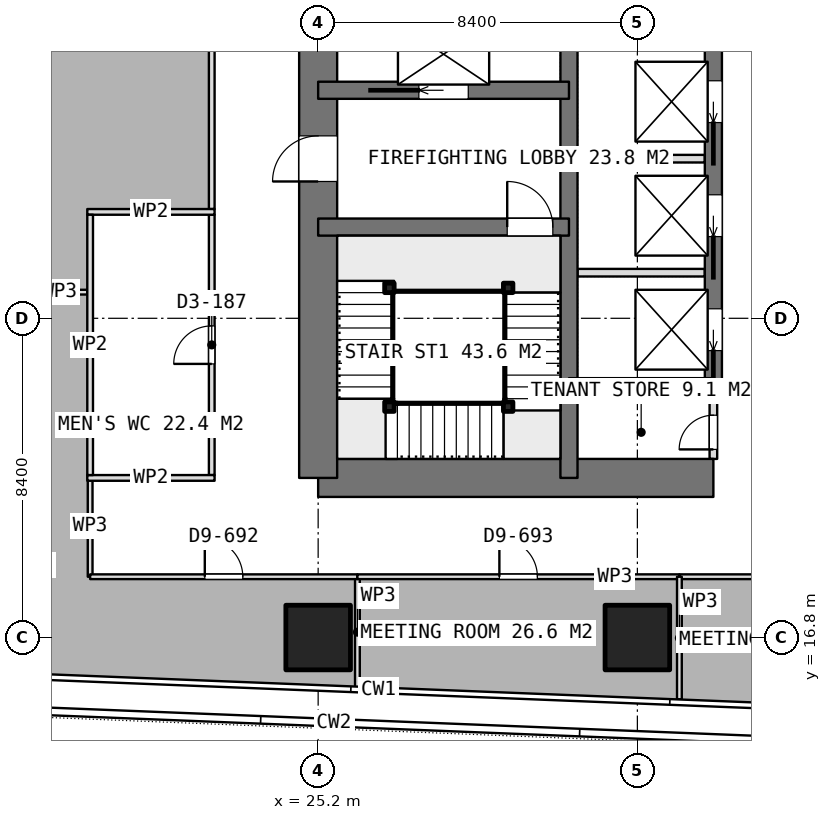
"""IFC4 building model, lengths in metres.
Left out: names, types, materials, properties, quantities, classifications, styles, units other than length and angle.
Written with IfcOpenShell. Run it as: python <this file> out.ifc"""

import sys

from ifc_helpers import new_model, si_unit, direction, frame, frame_2d, origin, origin_2d, place, context, subcontext, project, spatial, rectangle, extrude, element, fill, save


model = new_model("IFC4")
c1 = context("Model", 3, precision=1e-05, world=origin(), true_north=direction((0.0, 1.0)))
c2 = subcontext(c1, "Body", "Model", "MODEL_VIEW")
j1 = project(units=[si_unit("LENGTHUNIT", "METRE"), si_unit("PLANEANGLEUNIT", "RADIAN")], contexts=[c1])
p1 = place(None, origin())
s1 = spatial("IfcSite", under=j1, at=p1, CompositionType="ELEMENT")
p2 = place(p1, origin())
s2 = spatial("IfcBuilding", under=s1, at=p2, CompositionType="ELEMENT")
p3 = place(p2, frame((0.0, 0.0, 180.2)))
s3 = spatial("IfcBuildingStorey", under=s2, at=p3, CompositionType="ELEMENT", Elevation=180.2)
p4 = place(p3, frame((25.2, 21.0, 0.0), z_axis=(0.0, 0.0, 1.0), x_axis=(1.0, 0.0, 0.0)))
e1 = element("IfcWall", 1, at=p4, inside=s3, PredefinedType="SHEAR", context=c2, shape_type="SweptSolid", body=[
    extrude(rectangle(XDim=10.4, YDim=1.0, at=frame_2d((5.2, 0.0))), origin(), (0.0, 0.0, 1.0), 3.75),
])
p5 = place(p3, frame((25.2, 21.0, 0.0), z_axis=(0.0, 0.0, 1.0), x_axis=(0.0, 1.0, 0.0)))
e2 = element("IfcWall", 2, at=p5, inside=s3, PredefinedType="SHEAR", context=c2, shape_type="SweptSolid", body=[
    extrude(rectangle(XDim=25.2, YDim=1.0, at=frame_2d((12.6, 0.0))), origin(), (0.0, 0.0, 1.0), 3.75),
])
p6 = place(p5, frame((7.8, 0.0, 0.0)))
e3 = element("IfcOpeningElement", 3, at=p6, cuts=e2, PredefinedType="OPENING", context=c2, shape_type="SweptSolid", body=[
    extrude(rectangle(XDim=1.2, YDim=2.1, at=frame_2d((0.6, 1.05))), frame((0.0, 0.51, 0.0), z_axis=(0.0, -1.0, 0.0), x_axis=(1.0, 0.0, 0.0)), (0.0, 0.0, 1.0), 1.02),
])
p7 = place(p5, frame((14.25, 0.0, 0.0)))
e4 = element("IfcOpeningElement", 4, at=p7, cuts=e2, PredefinedType="OPENING", context=c2, shape_type="SweptSolid", body=[
    extrude(rectangle(XDim=0.9, YDim=2.1, at=frame_2d((0.45, 1.05))), frame((0.0, 0.51, 0.0), z_axis=(0.0, -1.0, 0.0), x_axis=(1.0, 0.0, 0.0)), (0.0, 0.0, 1.0), 1.02),
])
p8 = place(p5, frame((16.85, 0.0, 0.0)))
e5 = element("IfcOpeningElement", 5, at=p8, cuts=e2, PredefinedType="OPENING", context=c2, shape_type="SweptSolid", body=[
    extrude(rectangle(XDim=0.9, YDim=2.1, at=frame_2d((0.45, 1.05))), frame((0.0, 0.51, 0.0), z_axis=(0.0, -1.0, 0.0), x_axis=(1.0, 0.0, 0.0)), (0.0, 0.0, 1.0), 1.02),
])
p9 = place(p5, frame((19.025, 0.0, 0.0)))
e6 = element("IfcOpeningElement", 6, at=p9, cuts=e2, PredefinedType="OPENING", context=c2, shape_type="SweptSolid", body=[
    extrude(rectangle(XDim=1.2, YDim=2.1, at=frame_2d((0.6, 1.05))), frame((0.0, 0.51, 0.0), z_axis=(0.0, -1.0, 0.0), x_axis=(1.0, 0.0, 0.0)), (0.0, 0.0, 1.0), 1.02),
])
p10 = place(p3, frame((31.8, 21.0, 0.0), z_axis=(0.0, 0.0, 1.0), x_axis=(0.0, 1.0, 0.0)))
e7 = element("IfcWall", 7, at=p10, inside=s3, PredefinedType="SHEAR", context=c2, shape_type="SweptSolid", body=[
    extrude(rectangle(XDim=25.2, YDim=0.45, at=frame_2d((12.6, 0.0))), origin(), (0.0, 0.0, 1.0), 3.75),
])
p11 = place(p3, frame((35.6, 23.4, 0.0), z_axis=(0.0, 0.0, 1.0), x_axis=(0.0, 1.0, 0.0)))
e8 = element("IfcWall", 8, at=p11, inside=s3, PredefinedType="SHEAR", context=c2, shape_type="SweptSolid", body=[
    extrude(rectangle(XDim=18.0, YDim=0.45, at=frame_2d((9.0, 0.0))), origin(), (0.0, 0.0, 1.0), 3.75),
])
p12 = place(p11, frame((0.95, 0.0, 0.0)))
e9 = element("IfcOpeningElement", 9, at=p12, cuts=e8, PredefinedType="OPENING", context=c2, shape_type="SweptSolid", body=[
    extrude(rectangle(XDim=1.1, YDim=2.1, at=frame_2d((0.55, 1.05))), frame((0.0, 0.235, 0.0), z_axis=(0.0, -1.0, 0.0), x_axis=(1.0, 0.0, 0.0)), (0.0, 0.0, 1.0), 0.47),
])
p13 = place(p11, frame((3.95, 0.0, 0.0)))
e10 = element("IfcOpeningElement", 10, at=p13, cuts=e8, PredefinedType="OPENING", context=c2, shape_type="SweptSolid", body=[
    extrude(rectangle(XDim=1.1, YDim=2.1, at=frame_2d((0.55, 1.05))), frame((0.0, 0.235, 0.0), z_axis=(0.0, -1.0, 0.0), x_axis=(1.0, 0.0, 0.0)), (0.0, 0.0, 1.0), 0.47),
])
p14 = place(p11, frame((6.95, 0.0, 0.0)))
e11 = element("IfcOpeningElement", 11, at=p14, cuts=e8, PredefinedType="OPENING", context=c2, shape_type="SweptSolid", body=[
    extrude(rectangle(XDim=1.1, YDim=2.1, at=frame_2d((0.55, 1.05))), frame((0.0, 0.235, 0.0), z_axis=(0.0, -1.0, 0.0), x_axis=(1.0, 0.0, 0.0)), (0.0, 0.0, 1.0), 0.47),
])
p15 = place(p11, frame((9.95, 0.0, 0.0)))
e12 = element("IfcOpeningElement", 12, at=p15, cuts=e8, PredefinedType="OPENING", context=c2, shape_type="SweptSolid", body=[
    extrude(rectangle(XDim=1.1, YDim=2.1, at=frame_2d((0.55, 1.05))), frame((0.0, 0.235, 0.0), z_axis=(0.0, -1.0, 0.0), x_axis=(1.0, 0.0, 0.0)), (0.0, 0.0, 1.0), 0.47),
])
p16 = place(p11, frame((12.95, 0.0, 0.0)))
e13 = element("IfcOpeningElement", 13, at=p16, cuts=e8, PredefinedType="OPENING", context=c2, shape_type="SweptSolid", body=[
    extrude(rectangle(XDim=1.1, YDim=2.1, at=frame_2d((0.55, 1.05))), frame((0.0, 0.235, 0.0), z_axis=(0.0, -1.0, 0.0), x_axis=(1.0, 0.0, 0.0)), (0.0, 0.0, 1.0), 0.47),
])
p17 = place(p11, frame((15.95, 0.0, 0.0)))
e14 = element("IfcOpeningElement", 14, at=p17, cuts=e8, PredefinedType="OPENING", context=c2, shape_type="SweptSolid", body=[
    extrude(rectangle(XDim=1.1, YDim=2.1, at=frame_2d((0.55, 1.05))), frame((0.0, 0.235, 0.0), z_axis=(0.0, -1.0, 0.0), x_axis=(1.0, 0.0, 0.0)), (0.0, 0.0, 1.0), 0.47),
])
p18 = place(p3, frame((31.8, 23.4, 0.0), z_axis=(0.0, 0.0, 1.0), x_axis=(1.0, 0.0, 0.0)))
e15 = element("IfcWall", 15, at=p18, inside=s3, PredefinedType="SHEAR", context=c2, shape_type="SweptSolid", body=[
    extrude(rectangle(XDim=3.8, YDim=0.45, at=frame_2d((1.9, 0.0))), origin(), (0.0, 0.0, 1.0), 3.75),
])
p19 = place(p3, frame((25.2, 27.6, 0.0), z_axis=(0.0, 0.0, 1.0), x_axis=(1.0, 0.0, 0.0)))
e16 = element("IfcWall", 16, at=p19, inside=s3, PredefinedType="SHEAR", context=c2, shape_type="SweptSolid", body=[
    extrude(rectangle(XDim=6.6, YDim=0.45, at=frame_2d((3.3, 0.0))), origin(), (0.0, 0.0, 1.0), 3.75),
])
p20 = place(p19, frame((4.975, 0.0, 0.0)))
e17 = element("IfcOpeningElement", 17, at=p20, cuts=e16, PredefinedType="OPENING", context=c2, shape_type="SweptSolid", body=[
    extrude(rectangle(XDim=1.2, YDim=2.1, at=frame_2d((0.6, 1.05))), frame((0.0, 0.235, 0.0), z_axis=(0.0, -1.0, 0.0), x_axis=(1.0, 0.0, 0.0)), (0.0, 0.0, 1.0), 0.47),
])
p21 = place(p3, frame((25.2, 31.2, 0.0), z_axis=(0.0, 0.0, 1.0), x_axis=(1.0, 0.0, 0.0)))
e18 = element("IfcWall", 18, at=p21, inside=s3, PredefinedType="SHEAR", context=c2, shape_type="SweptSolid", body=[
    extrude(rectangle(XDim=6.6, YDim=0.45, at=frame_2d((3.3, 0.0))), origin(), (0.0, 0.0, 1.0), 3.75),
])
p22 = place(p21, frame((2.65, 0.0, 0.0)))
e19 = element("IfcOpeningElement", 19, at=p22, cuts=e18, PredefinedType="OPENING", context=c2, shape_type="SweptSolid", body=[
    extrude(rectangle(XDim=1.3, YDim=2.1, at=frame_2d((0.65, 1.05))), frame((0.0, 0.235, 0.0), z_axis=(0.0, -1.0, 0.0), x_axis=(1.0, 0.0, 0.0)), (0.0, 0.0, 1.0), 0.47),
])
for number, where, z_axis, x_axis in (
    (20, (25.2, 16.8, 0.0), (0.0, 0.0, 1.0), (1.0, 0.0, 0.0)),
    (21, (33.6, 16.8, 0.0), (0.0, 0.0, 1.0), (1.0, 0.0, 0.0)),
):
    element("IfcColumn", number, at=place(p3, frame(where, z_axis=z_axis, x_axis=x_axis)), inside=s3, PredefinedType="COLUMN", context=c2, shape_type="SweptSolid", body=[
        extrude(rectangle(XDim=1.7, YDim=1.7, at=origin_2d()), origin(), (0.0, 0.0, 1.0), 3.75),
    ])
for number, where, z_axis, x_axis in (
    (22, (32.025, 26.4, 0.0), (0.0, 0.0, 1.0), (1.0, 0.0, 0.0)),
    (23, (32.025, 29.4, 0.0), (0.0, 0.0, 1.0), (1.0, 0.0, 0.0)),
):
    element("IfcWall", number, at=place(p3, frame(where, z_axis=z_axis, x_axis=x_axis)), inside=s3, PredefinedType="PARTITIONING", context=c2, shape_type="SweptSolid", body=[
        extrude(rectangle(XDim=3.35, YDim=0.2, at=frame_2d((1.675, 0.0))), origin(), (0.0, 0.0, 1.0), 3.5),
    ])
p23 = place(p3, frame((35.6, 21.5, 0.0), z_axis=(0.0, 0.0, 1.0), x_axis=(0.0, 1.0, 0.0)))
e24 = element("IfcWall", 24, at=p23, inside=s3, PredefinedType="PARTITIONING", context=c2, shape_type="SweptSolid", body=[
    extrude(rectangle(XDim=1.675, YDim=0.2, at=frame_2d((0.837, 0.0))), origin(), (0.0, 0.0, 1.0), 3.5),
])
p24 = place(p23, frame((0.25, 0.0, 0.0)))
e25 = element("IfcOpeningElement", 25, at=p24, cuts=e24, PredefinedType="OPENING", context=c2, shape_type="SweptSolid", body=[
    extrude(rectangle(XDim=0.9, YDim=2.1, at=frame_2d((0.45, 1.05))), frame((0.0, 0.11, 0.0), z_axis=(0.0, -1.0, 0.0), x_axis=(1.0, 0.0, 0.0)), (0.0, 0.0, 1.0), 0.22),
])
for number, where, z_axis, x_axis in (
    (26, (19.125, 21.0, 0.0), (0.0, 0.0, 1.0), (1.0, 0.0, 0.0)),
    (27, (19.125, 28.0, 0.0), (0.0, 0.0, 1.0), (1.0, 0.0, 0.0)),
):
    element("IfcWall", number, at=place(p3, frame(where, z_axis=z_axis, x_axis=x_axis)), inside=s3, PredefinedType="PARTITIONING", context=c2, shape_type="SweptSolid", body=[
        extrude(rectangle(XDim=3.35, YDim=0.15, at=frame_2d((1.675, 0.0))), origin(), (0.0, 0.0, 1.0), 3.5),
    ])
p25 = place(p3, frame((19.2, 21.075, 0.0), z_axis=(0.0, 0.0, 1.0), x_axis=(0.0, 1.0, 0.0)))
e28 = element("IfcWall", 28, at=p25, inside=s3, PredefinedType="PARTITIONING", context=c2, shape_type="SweptSolid", body=[
    extrude(rectangle(XDim=6.85, YDim=0.15, at=frame_2d((3.425, 0.0))), origin(), (0.0, 0.0, 1.0), 3.5),
])
p26 = place(p3, frame((22.4, 21.075, 0.0), z_axis=(0.0, 0.0, 1.0), x_axis=(0.0, 1.0, 0.0)))
e29 = element("IfcWall", 29, at=p26, inside=s3, PredefinedType="PARTITIONING", context=c2, shape_type="SweptSolid", body=[
    extrude(rectangle(XDim=6.85, YDim=0.15, at=frame_2d((3.425, 0.0))), origin(), (0.0, 0.0, 1.0), 3.5),
])
p27 = place(p26, frame((2.925, 0.0, 0.0)))
e30 = element("IfcOpeningElement", 30, at=p27, cuts=e29, PredefinedType="OPENING", context=c2, shape_type="SweptSolid", body=[
    extrude(rectangle(XDim=1.0, YDim=2.1, at=frame_2d((0.5, 1.05))), frame((0.0, 0.085, 0.0), z_axis=(0.0, -1.0, 0.0), x_axis=(1.0, 0.0, 0.0)), (0.0, 0.0, 1.0), 0.17),
])
p28 = place(p3, frame((34.706, 18.4, 0.0), z_axis=(0.0, 0.0, 1.0), x_axis=(1.0, 0.0, 0.0)))
e31 = element("IfcWall", 31, at=p28, inside=s3, PredefinedType="PARTITIONING", context=c2, shape_type="SweptSolid", body=[
    extrude(rectangle(XDim=8.291, YDim=0.125, at=frame_2d((4.146, 0.0))), origin(), (0.0, 0.0, 1.0), 3.5),
])
p29 = place(p28, frame((3.645, 0.0, 0.0)))
e32 = element("IfcOpeningElement", 32, at=p29, cuts=e31, PredefinedType="OPENING", context=c2, shape_type="SweptSolid", body=[
    extrude(rectangle(XDim=1.0, YDim=2.1, at=frame_2d((0.5, 1.05))), frame((0.0, 0.073, 0.0), z_axis=(0.0, -1.0, 0.0), x_axis=(1.0, 0.0, 0.0)), (0.0, 0.0, 1.0), 0.145),
])
p30 = place(p3, frame((34.706, 15.175, 0.0), z_axis=(0.0, 0.0, 1.0), x_axis=(0.0, 1.0, 0.0)))
e33 = element("IfcWall", 33, at=p30, inside=s3, PredefinedType="PARTITIONING", context=c2, shape_type="SweptSolid", body=[
    extrude(rectangle(XDim=3.225, YDim=0.125, at=frame_2d((1.612, 0.0))), origin(), (0.0, 0.0, 1.0), 3.5),
])
p31 = place(p3, frame((26.233, 18.4, 0.0), z_axis=(0.0, 0.0, 1.0), x_axis=(0.0, -1.0, 0.0)))
e34 = element("IfcWall", 34, at=p31, inside=s3, PredefinedType="PARTITIONING", context=c2, shape_type="SweptSolid", body=[
    extrude(rectangle(XDim=2.917, YDim=0.125, at=frame_2d((1.458, 0.0))), origin(), (0.0, 0.0, 1.0), 3.5),
])
p32 = place(p3, frame((17.67, 25.888, 0.0), z_axis=(0.0, 0.0, 1.0), x_axis=(1.0, 0.0, 0.0)))
e35 = element("IfcWall", 35, at=p32, inside=s3, PredefinedType="PARTITIONING", context=c2, shape_type="SweptSolid", body=[
    extrude(rectangle(XDim=1.455, YDim=0.125, at=frame_2d((0.728, 0.0))), origin(), (0.0, 0.0, 1.0), 3.5),
])
p33 = place(p3, frame((19.2, 21.075, 0.0), z_axis=(0.0, 0.0, 1.0), x_axis=(0.0, -1.0, 0.0)))
e36 = element("IfcWall", 36, at=p33, inside=s3, PredefinedType="PARTITIONING", context=c2, shape_type="SweptSolid", body=[
    extrude(rectangle(XDim=2.675, YDim=0.125, at=frame_2d((1.337, 0.0))), origin(), (0.0, 0.0, 1.0), 3.5),
])
p34 = place(p3, frame((19.2, 18.4, 0.0), z_axis=(0.0, 0.0, 1.0), x_axis=(1.0, 0.0, 0.0)))
e37 = element("IfcWall", 37, at=p34, inside=s3, PredefinedType="PARTITIONING", context=c2, shape_type="SweptSolid", body=[
    extrude(rectangle(XDim=7.033, YDim=0.125, at=frame_2d((3.517, 0.0))), origin(), (0.0, 0.0, 1.0), 3.5),
])
p35 = place(p34, frame((3.017, 0.0, 0.0)))
e38 = element("IfcOpeningElement", 38, at=p35, cuts=e37, PredefinedType="OPENING", context=c2, shape_type="SweptSolid", body=[
    extrude(rectangle(XDim=1.0, YDim=2.1, at=frame_2d((0.5, 1.05))), frame((0.0, 0.073, 0.0), z_axis=(0.0, -1.0, 0.0), x_axis=(1.0, 0.0, 0.0)), (0.0, 0.0, 1.0), 0.145),
])
p36 = place(p3, frame((26.233, 18.4, 0.0), z_axis=(0.0, 0.0, 1.0), x_axis=(1.0, 0.0, 0.0)))
e39 = element("IfcWall", 39, at=p36, inside=s3, PredefinedType="PARTITIONING", context=c2, shape_type="SweptSolid", body=[
    extrude(rectangle(XDim=8.472, YDim=0.125, at=frame_2d((4.236, 0.0))), origin(), (0.0, 0.0, 1.0), 3.5),
])
p37 = place(p36, frame((3.736, 0.0, 0.0)))
e40 = element("IfcOpeningElement", 40, at=p37, cuts=e39, PredefinedType="OPENING", context=c2, shape_type="SweptSolid", body=[
    extrude(rectangle(XDim=1.0, YDim=2.1, at=frame_2d((0.5, 1.05))), frame((0.0, 0.073, 0.0), z_axis=(0.0, -1.0, 0.0), x_axis=(1.0, 0.0, 0.0)), (0.0, 0.0, 1.0), 0.145),
])
p38 = place(p3, frame((22.4, 52.75, 0.0), z_axis=(0.0, 0.0, 1.0), x_axis=(0.0, -1.0, 0.0)))
e41 = element("IfcWall", 41, at=p38, inside=s3, PredefinedType="PARTITIONING", context=c2, shape_type="SweptSolid", body=[
    extrude(rectangle(XDim=24.675, YDim=0.15, at=frame_2d((12.337, 0.0))), origin(), (0.0, 0.0, 1.0), 3.5),
])
p39 = place(p38, frame((11.875, 0.0, 0.0)))
e42 = element("IfcOpeningElement", 42, at=p39, cuts=e41, PredefinedType="OPENING", context=c2, shape_type="SweptSolid", body=[
    extrude(rectangle(XDim=1.0, YDim=2.1, at=frame_2d((0.5, 1.05))), frame((0.0, 0.085, 0.0), z_axis=(0.0, -1.0, 0.0), x_axis=(1.0, 0.0, 0.0)), (0.0, 0.0, 1.0), 0.17),
])
for number, where, z_axis, x_axis in (
    (43, (30.2, 26.0, 0.0), (0.0, 0.0, 1.0), (1.0, 0.0, 0.0)),
    (44, (30.2, 22.875, 0.0), (0.0, 0.0, 1.0), (1.0, 0.0, 0.0)),
    (45, (27.075, 22.875, 0.0), (0.0, 0.0, 1.0), (1.0, 0.0, 0.0)),
    (46, (27.075, 26.0, 0.0), (0.0, 0.0, 1.0), (1.0, 0.0, 0.0)),
):
    element("IfcColumn", number, at=place(p3, frame(where, z_axis=z_axis, x_axis=x_axis)), inside=s3, PredefinedType="COLUMN", context=c2, shape_type="SweptSolid", body=[
        extrude(rectangle(XDim=0.25, YDim=0.25, at=origin_2d()), origin(), (0.0, 0.0, 1.0), 3.75),
    ])
p40 = place(p6, origin())
e47 = element("IfcDoor", 47, at=p40, inside=s3, OperationType="SINGLE_SWING_LEFT", PredefinedType="DOOR", context=c2, shape_type="SweptSolid", body=[
    extrude(rectangle(XDim=1.2, YDim=2.1, at=frame_2d((0.6, 1.05))), frame((0.0, 0.025, 0.0), z_axis=(0.0, -1.0, 0.0), x_axis=(1.0, 0.0, 0.0)), (0.0, 0.0, 1.0), 0.05),
])
fill(e3, e47)
p41 = place(p24, origin())
e48 = element("IfcDoor", 48, at=p41, inside=s3, OperationType="SINGLE_SWING_LEFT", PredefinedType="DOOR", context=c2, shape_type="SweptSolid", body=[
    extrude(rectangle(XDim=0.9, YDim=2.1, at=frame_2d((0.45, 1.05))), frame((0.0, 0.025, 0.0), z_axis=(0.0, -1.0, 0.0), x_axis=(1.0, 0.0, 0.0)), (0.0, 0.0, 1.0), 0.05),
])
fill(e25, e48)
p42 = place(p12, origin())
e49 = element("IfcDoor", 49, at=p42, inside=s3, OperationType="SLIDING_TO_LEFT", PredefinedType="USERDEFINED", context=c2, shape_type="SweptSolid", body=[
    extrude(rectangle(XDim=1.1, YDim=2.1, at=frame_2d((0.55, 1.05))), frame((0.0, 0.025, 0.0), z_axis=(0.0, -1.0, 0.0), x_axis=(1.0, 0.0, 0.0)), (0.0, 0.0, 1.0), 0.05),
])
fill(e9, e49)
p43 = place(p13, origin())
e50 = element("IfcDoor", 50, at=p43, inside=s3, OperationType="SLIDING_TO_LEFT", PredefinedType="USERDEFINED", context=c2, shape_type="SweptSolid", body=[
    extrude(rectangle(XDim=1.1, YDim=2.1, at=frame_2d((0.55, 1.05))), frame((0.0, 0.025, 0.0), z_axis=(0.0, -1.0, 0.0), x_axis=(1.0, 0.0, 0.0)), (0.0, 0.0, 1.0), 0.05),
])
fill(e10, e50)
p44 = place(p14, origin())
e51 = element("IfcDoor", 51, at=p44, inside=s3, OperationType="SLIDING_TO_LEFT", PredefinedType="USERDEFINED", context=c2, shape_type="SweptSolid", body=[
    extrude(rectangle(XDim=1.1, YDim=2.1, at=frame_2d((0.55, 1.05))), frame((0.0, 0.025, 0.0), z_axis=(0.0, -1.0, 0.0), x_axis=(1.0, 0.0, 0.0)), (0.0, 0.0, 1.0), 0.05),
])
fill(e11, e51)
p45 = place(p22, origin())
e52 = element("IfcDoor", 52, at=p45, inside=s3, OperationType="SLIDING_TO_LEFT", PredefinedType="USERDEFINED", context=c2, shape_type="SweptSolid", body=[
    extrude(rectangle(XDim=1.3, YDim=2.1, at=frame_2d((0.65, 1.05))), frame((0.0, 0.025, 0.0), z_axis=(0.0, -1.0, 0.0), x_axis=(1.0, 0.0, 0.0)), (0.0, 0.0, 1.0), 0.05),
])
fill(e19, e52)
p46 = place(p27, origin())
e53 = element("IfcDoor", 53, at=p46, inside=s3, OperationType="SINGLE_SWING_LEFT", PredefinedType="DOOR", context=c2, shape_type="SweptSolid", body=[
    extrude(rectangle(XDim=1.0, YDim=2.1, at=frame_2d((0.5, 1.05))), frame((0.0, 0.025, 0.0), z_axis=(0.0, -1.0, 0.0), x_axis=(1.0, 0.0, 0.0)), (0.0, 0.0, 1.0), 0.05),
])
fill(e30, e53)
p47 = place(p35, origin())
e54 = element("IfcDoor", 54, at=p47, inside=s3, OperationType="SINGLE_SWING_LEFT", PredefinedType="DOOR", context=c2, shape_type="SweptSolid", body=[
    extrude(rectangle(XDim=1.0, YDim=2.1, at=frame_2d((0.5, 1.05))), frame((0.0, 0.025, 0.0), z_axis=(0.0, -1.0, 0.0), x_axis=(1.0, 0.0, 0.0)), (0.0, 0.0, 1.0), 0.05),
])
fill(e38, e54)
p48 = place(p37, origin())
e55 = element("IfcDoor", 55, at=p48, inside=s3, OperationType="SINGLE_SWING_LEFT", PredefinedType="DOOR", context=c2, shape_type="SweptSolid", body=[
    extrude(rectangle(XDim=1.0, YDim=2.1, at=frame_2d((0.5, 1.05))), frame((0.0, 0.025, 0.0), z_axis=(0.0, -1.0, 0.0), x_axis=(1.0, 0.0, 0.0)), (0.0, 0.0, 1.0), 0.05),
])
fill(e40, e55)
p49 = place(p20, origin())
e56 = element("IfcDoor", 56, at=p49, inside=s3, OperationType="SINGLE_SWING_RIGHT", PredefinedType="DOOR", context=c2, shape_type="SweptSolid", body=[
    extrude(rectangle(XDim=1.2, YDim=2.1, at=frame_2d((0.6, 1.05))), frame((0.0, 0.025, 0.0), z_axis=(0.0, -1.0, 0.0), x_axis=(1.0, 0.0, 0.0)), (0.0, 0.0, 1.0), 0.05),
])
fill(e17, e56)
save(model, sys.argv[1])
